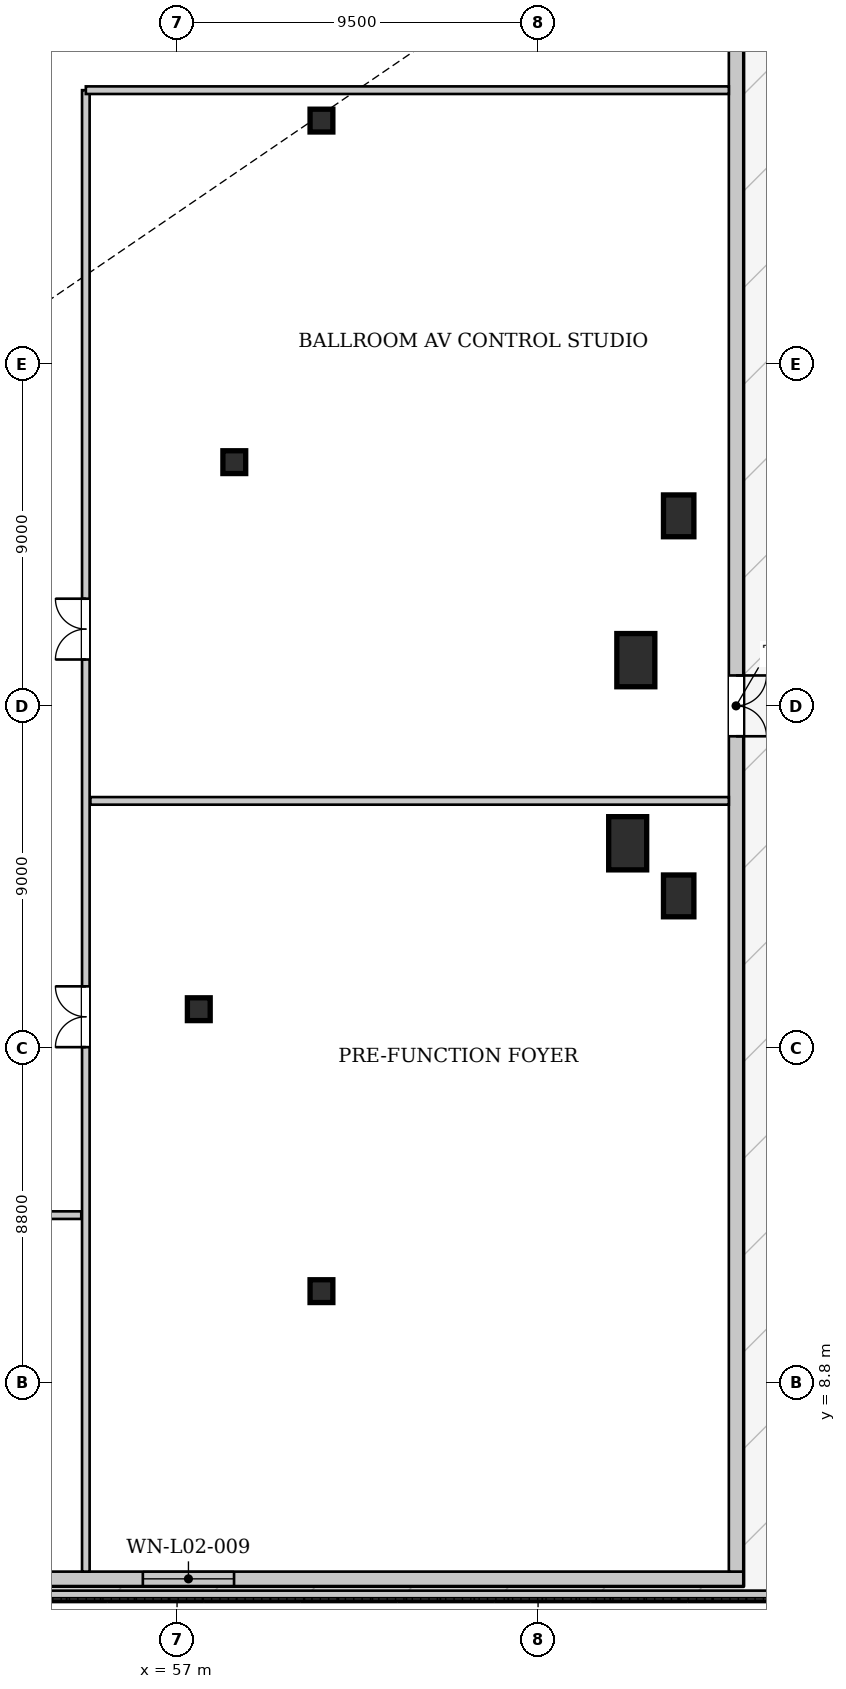
"""IFC4 building model, lengths in metres.
Left out: names, types, materials, properties, quantities, classifications, styles, units other than length and angle.
Written with IfcOpenShell. Run it as: python <this file> out.ifc"""

import sys

from ifc_helpers import new_model, si_unit, direction, frame, frame_2d, origin, origin_2d, place, context, subcontext, project, spatial, rectangle, hollow_rectangle, extrude, source, transform, mapped, element, fill, save


model = new_model("IFC4")
c1 = context("Model", 3, precision=1e-05, world=origin(), true_north=direction((0.0, 1.0)))
c2 = subcontext(c1, "Body", "Model", "MODEL_VIEW")
j1 = project(units=[si_unit("LENGTHUNIT", "METRE"), si_unit("PLANEANGLEUNIT", "RADIAN")], contexts=[c1])
p1 = place(None, origin())
s1 = spatial("IfcSite", under=j1, at=p1, CompositionType="ELEMENT")
p2 = place(p1, origin())
s2 = spatial("IfcBuilding", under=s1, at=p2, CompositionType="ELEMENT")
p3 = place(p2, frame((0.0, 0.0, 10.2)))
s3 = spatial("IfcBuildingStorey", under=s2, at=p3, CompositionType="ELEMENT", Elevation=10.2)
m1 = source(origin(), c2, "Body", "SweptSolid", [
    extrude(rectangle(XDim=1.0, YDim=1.4, at=origin_2d()), origin(), (0.0, 0.0, 1.0), 5.235),
])
for number, where, z_axis, x_axis in (
    (1, (68.858, 22.985, 0.0), (0.0, 0.0, 1.0), (1.0, 0.0, 0.0)),
    (2, (69.073, 27.803, 0.0), (0.0, 0.0, 1.0), (1.0, 0.0, 0.0)),
):
    element("IfcColumn", number, at=place(p3, frame(where, z_axis=z_axis, x_axis=x_axis)), inside=s3, PredefinedType="COLUMN", context=c2, shape_type="MappedRepresentation", body=[
        mapped(m1, transform((0.0, 0.0, 0.0), x_axis=(1.0, 0.0, 0.0), y_axis=(0.0, 1.0, 0.0), z_axis=(0.0, 0.0, 1.0), scale=1.0)),
    ])
m2 = source(origin(), c2, "Body", "SweptSolid", [
    extrude(hollow_rectangle(XDim=0.6, YDim=0.6, WallThickness=0.035, at=origin_2d()), origin(), (0.0, 0.0, 1.0), 5.235),
])
for number, where, z_axis, x_axis in (
    (3, (60.8, 11.2, 0.0), (0.0, 0.0, 1.0), (1.0, 0.0, 0.0)),
    (4, (60.8, 42.0, 0.0), (0.0, 0.0, 1.0), (1.0, 0.0, 0.0)),
    (5, (58.507, 33.013, 0.0), (0.0, 0.0, 1.0), (1.0, 0.0, 0.0)),
    (6, (57.572, 18.618, 0.0), (0.0, 0.0, 1.0), (1.0, 0.0, 0.0)),
):
    element("IfcColumn", number, at=place(p3, frame(where, z_axis=z_axis, x_axis=x_axis)), inside=s3, PredefinedType="COLUMN", context=c2, shape_type="MappedRepresentation", body=[
        mapped(m2, transform((0.0, 0.0, 0.0), x_axis=(1.0, 0.0, 0.0), y_axis=(0.0, 1.0, 0.0), z_axis=(0.0, 0.0, 1.0), scale=1.0)),
    ])
m3 = source(origin(), c2, "Body", "SweptSolid", [
    extrude(rectangle(XDim=0.8, YDim=1.1, at=origin_2d()), origin(), (0.0, 0.0, 1.0), 5.235),
])
for number, where, z_axis, x_axis in (
    (7, (70.2, 21.6, 0.0), (0.0, 0.0, 1.0), (1.0, 0.0, 0.0)),
    (8, (70.2, 31.6, 0.0), (0.0, 0.0, 1.0), (1.0, 0.0, 0.0)),
):
    element("IfcColumn", number, at=place(p3, frame(where, z_axis=z_axis, x_axis=x_axis)), inside=s3, PredefinedType="COLUMN", context=c2, shape_type="MappedRepresentation", body=[
        mapped(m3, transform((0.0, 0.0, 0.0), x_axis=(1.0, 0.0, 0.0), y_axis=(0.0, 1.0, 0.0), z_axis=(0.0, 0.0, 1.0), scale=1.0)),
    ])
p4 = place(p3, frame((71.9, 3.63, 0.0), z_axis=(0.0, 0.0, 1.0), x_axis=(-1.0, 0.0, 0.0)))
e9 = element("IfcWall", 9, at=p4, inside=s3, PredefinedType="SOLIDWALL", context=c2, shape_type="SweptSolid", body=[
    extrude(rectangle(XDim=30.7, YDim=0.38, at=frame_2d((15.35, 0.0))), origin(), (0.0, 0.0, 1.0), 4.472),
])
p5 = place(p4, frame((13.4, 0.0, 0.85)))
e10 = element("IfcOpeningElement", 10, at=p5, cuts=e9, PredefinedType="OPENING", context=c2, shape_type="SweptSolid", body=[
    extrude(rectangle(XDim=2.4, YDim=3.0, at=frame_2d((1.2, 1.5))), frame((0.0, 0.2, 0.0), z_axis=(0.0, -1.0, 0.0), x_axis=(1.0, 0.0, 0.0)), (0.0, 0.0, 1.0), 0.4),
])
p6 = place(p3, frame((71.71, 49.38, 0.0), z_axis=(0.0, 0.0, 1.0), x_axis=(0.0, -1.0, 0.0)))
e11 = element("IfcWall", 11, at=p6, inside=s3, PredefinedType="SOLIDWALL", context=c2, shape_type="SweptSolid", body=[
    extrude(rectangle(XDim=45.56, YDim=0.38, at=frame_2d((22.78, 0.0))), origin(), (0.0, 0.0, 1.0), 4.472),
])
p7 = place(p6, frame((21.98, 0.0, 0.0)))
e12 = element("IfcOpeningElement", 12, at=p7, cuts=e11, PredefinedType="OPENING", context=c2, shape_type="SweptSolid", body=[
    extrude(rectangle(XDim=1.6, YDim=2.3, at=frame_2d((0.8, 1.15))), frame((0.0, 0.2, 0.0), z_axis=(0.0, -1.0, 0.0), x_axis=(1.0, 0.0, 0.0)), (0.0, 0.0, 1.0), 0.4),
])
p8 = place(p3, frame((3.25, 3.18, 0.0), z_axis=(0.0, 0.0, 1.0), x_axis=(1.0, 0.0, 0.0)))
e13 = element("IfcWall", 13, at=p8, inside=s3, PredefinedType="PARAPET", context=c2, shape_type="SweptSolid", body=[
    extrude(rectangle(XDim=69.5, YDim=0.28, at=frame_2d((34.75, 0.0))), origin(), (0.0, 0.0, 1.0), 0.45),
])
p9 = place(p3, frame((19.72, 13.2, 0.0), z_axis=(0.0, 0.0, 1.0), x_axis=(1.0, 0.0, 0.0)))
e14 = element("IfcWall", 14, at=p9, inside=s3, PredefinedType="PARTITIONING", context=c2, shape_type="SweptSolid", body=[
    extrude(rectangle(XDim=34.76, YDim=0.2, at=frame_2d((17.38, 0.0))), origin(), (0.0, 0.0, 1.0), 4.43),
])
p10 = place(p9, frame((13.5, 0.0, 0.0)))
e15 = element("IfcOpeningElement", 15, at=p10, cuts=e14, PredefinedType="OPENING", context=c2, shape_type="SweptSolid", body=[
    extrude(rectangle(XDim=1.6, YDim=2.2, at=frame_2d((0.8, 1.1))), frame((0.0, 0.11, 0.0), z_axis=(0.0, -1.0, 0.0), x_axis=(1.0, 0.0, 0.0)), (0.0, 0.0, 1.0), 0.22),
])
p11 = place(p3, frame((54.6, 3.82, 0.0), z_axis=(0.0, 0.0, 1.0), x_axis=(0.0, 1.0, 0.0)))
e16 = element("IfcWall", 16, at=p11, inside=s3, PredefinedType="PARTITIONING", context=c2, shape_type="SweptSolid", body=[
    extrude(rectangle(XDim=38.98, YDim=0.2, at=frame_2d((19.49, 0.0))), origin(), (0.0, 0.0, 1.0), 4.43),
])
p12 = place(p11, frame((13.8, 0.0, 0.0)))
e17 = element("IfcOpeningElement", 17, at=p12, cuts=e16, PredefinedType="OPENING", context=c2, shape_type="SweptSolid", body=[
    extrude(rectangle(XDim=1.6, YDim=2.2, at=frame_2d((0.8, 1.1))), frame((0.0, 0.11, 0.0), z_axis=(0.0, -1.0, 0.0), x_axis=(1.0, 0.0, 0.0)), (0.0, 0.0, 1.0), 0.22),
])
p13 = place(p11, frame((24.0, 0.0, 0.0)))
e18 = element("IfcOpeningElement", 18, at=p13, cuts=e16, PredefinedType="OPENING", context=c2, shape_type="SweptSolid", body=[
    extrude(rectangle(XDim=1.6, YDim=2.2, at=frame_2d((0.8, 1.1))), frame((0.0, 0.11, 0.0), z_axis=(0.0, -1.0, 0.0), x_axis=(1.0, 0.0, 0.0)), (0.0, 0.0, 1.0), 0.22),
])
p14 = place(p3, frame((54.72, 24.1, 0.0), z_axis=(0.0, 0.0, 1.0), x_axis=(1.0, 0.0, 0.0)))
e19 = element("IfcWall", 19, at=p14, inside=s3, PredefinedType="PARTITIONING", context=c2, shape_type="SweptSolid", body=[
    extrude(rectangle(XDim=16.8, YDim=0.2, at=frame_2d((8.4, 0.0))), origin(), (0.0, 0.0, 1.0), 4.43),
])
p15 = place(p3, frame((54.6, 42.8, 0.0), z_axis=(0.0, 0.0, 1.0), x_axis=(1.0, 0.0, 0.0)))
e20 = element("IfcWall", 20, at=p15, inside=s3, PredefinedType="PARTITIONING", context=c2, shape_type="SweptSolid", body=[
    extrude(rectangle(XDim=16.92, YDim=0.2, at=frame_2d((8.46, 0.0))), origin(), (0.0, 0.0, 1.0), 4.43),
])
m4 = source(origin(), c2, "Body", "SweptSolid", [
    extrude(rectangle(XDim=1.6, YDim=2.3, at=frame_2d((0.8, 1.15))), frame((0.0, 0.025, 0.0), z_axis=(0.0, -1.0, 0.0), x_axis=(1.0, 0.0, 0.0)), (0.0, 0.0, 1.0), 0.05),
])
p16 = place(p7, origin())
e21 = element("IfcDoor", 21, at=p16, inside=s3, OperationType="DOUBLE_DOOR_SINGLE_SWING", PredefinedType="DOOR", context=c2, shape_type="MappedRepresentation", body=[
    mapped(m4, transform((0.0, 0.0, 0.0), x_axis=(1.0, 0.0, 0.0), y_axis=(0.0, 1.0, 0.0), z_axis=(0.0, 0.0, 1.0), scale=1.0)),
])
fill(e12, e21)
m5 = source(origin(), c2, "Body", "SweptSolid", [
    extrude(rectangle(XDim=2.4, YDim=3.0, at=frame_2d((1.2, 1.5))), frame((0.0, 0.03, 0.0), z_axis=(0.0, -1.0, 0.0), x_axis=(1.0, 0.0, 0.0)), (0.0, 0.0, 1.0), 0.06),
])
p17 = place(p5, origin())
e22 = element("IfcWindow", 22, at=p17, inside=s3, PartitioningType="SINGLE_PANEL", PredefinedType="WINDOW", context=c2, shape_type="MappedRepresentation", body=[
    mapped(m5, transform((0.0, 0.0, 0.0), x_axis=(1.0, 0.0, 0.0), y_axis=(0.0, 1.0, 0.0), z_axis=(0.0, 0.0, 1.0), scale=1.0)),
])
fill(e10, e22)
m6 = source(origin(), c2, "Body", "SweptSolid", [
    extrude(rectangle(XDim=1.6, YDim=2.2, at=frame_2d((0.8, 1.1))), frame((0.0, 0.025, 0.0), z_axis=(0.0, -1.0, 0.0), x_axis=(1.0, 0.0, 0.0)), (0.0, 0.0, 1.0), 0.05),
])
p18 = place(p12, origin())
e23 = element("IfcDoor", 23, at=p18, inside=s3, OperationType="DOUBLE_DOOR_SINGLE_SWING", PredefinedType="DOOR", context=c2, shape_type="MappedRepresentation", body=[
    mapped(m6, transform((0.0, 0.0, 0.0), x_axis=(1.0, 0.0, 0.0), y_axis=(0.0, 1.0, 0.0), z_axis=(0.0, 0.0, 1.0), scale=1.0)),
])
fill(e17, e23)
p19 = place(p13, origin())
e24 = element("IfcDoor", 24, at=p19, inside=s3, OperationType="DOUBLE_DOOR_SINGLE_SWING", PredefinedType="DOOR", context=c2, shape_type="MappedRepresentation", body=[
    mapped(m6, transform((0.0, 0.0, 0.0), x_axis=(1.0, 0.0, 0.0), y_axis=(0.0, 1.0, 0.0), z_axis=(0.0, 0.0, 1.0), scale=1.0)),
])
fill(e18, e24)
save(model, sys.argv[1])
